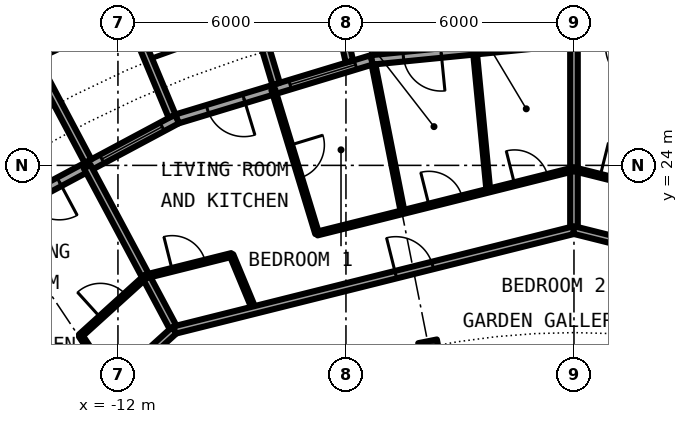
"""IFC4 building model, lengths in metres.
Left out: names, types, materials, properties, quantities, classifications, styles, units other than length and angle.
Written with IfcOpenShell. Run it as: python <this file> out.ifc"""

import sys

from ifc_helpers import new_model, si_unit, direction, frame, frame_2d, origin, origin_2d, place, context, subcontext, project, spatial, rectangle, circle, i_section, extrude, element, fill, save


model = new_model("IFC4")
c1 = context("Model", 3, precision=1e-05, world=origin(), true_north=direction((0.0, 1.0)))
c2 = subcontext(c1, "Body", "Model", "MODEL_VIEW")
j1 = project(units=[si_unit("LENGTHUNIT", "METRE"), si_unit("PLANEANGLEUNIT", "RADIAN")], contexts=[c1])
p1 = place(None, origin())
s1 = spatial("IfcSite", under=j1, at=p1, CompositionType="ELEMENT")
p2 = place(p1, origin())
s2 = spatial("IfcBuilding", under=s1, at=p2, CompositionType="ELEMENT")
p3 = place(p2, frame((0.0, 0.0, 151.3)))
s3 = spatial("IfcBuildingStorey", under=s2, at=p3, CompositionType="ELEMENT", Elevation=151.3)
p4 = place(p3, frame((-3.824, 19.223, 0.0), z_axis=(0.0, 0.0, 1.0), x_axis=(-0.195090322016, 0.980785280403, 0.0)))
e1 = element("IfcColumn", 1, at=p4, inside=s3, PredefinedType="COLUMN", context=c2, shape_type="SweptSolid", body=[
    extrude(i_section(OverallWidth=0.3, OverallDepth=0.5, WebThickness=0.014, FlangeThickness=0.028, FilletRadius=0.027, at=origin_2d()), origin(), (0.0, 0.0, 1.0), 3.05),
])
p5 = place(p3, frame((5.326, 26.775, 0.0), z_axis=(0.0, 0.0, 1.0), x_axis=(-0.995173996315, 0.098126026407, 0.0)))
e2 = element("IfcWall", 2, at=p5, inside=s3, PredefinedType="SOLIDWALL", context=c2, shape_type="SweptSolid", body=[
    extrude(rectangle(XDim=5.352, YDim=0.25, at=frame_2d((2.676, 0.0))), origin(), (0.0, 0.0, 1.0), 2.7),
])
p6 = place(p5, frame((0.441, 0.0, 0.3)))
e3 = element("IfcOpeningElement", 3, at=p6, cuts=e2, PredefinedType="OPENING", context=c2, shape_type="SweptSolid", body=[
    extrude(rectangle(XDim=1.8, YDim=2.1, at=frame_2d((0.9, 1.05))), frame((0.0, 0.135, 0.0), z_axis=(0.0, -1.0, 0.0), x_axis=(1.0, 0.0, 0.0)), (0.0, 0.0, 1.0), 0.27),
])
p7 = place(p5, frame((3.51, 0.0, 0.0)))
e4 = element("IfcOpeningElement", 4, at=p7, cuts=e2, PredefinedType="OPENING", context=c2, shape_type="SweptSolid", body=[
    extrude(rectangle(XDim=1.0, YDim=2.2, at=frame_2d((0.5, 1.1))), frame((0.0, 0.135, 0.0), z_axis=(0.0, -1.0, 0.0), x_axis=(1.0, 0.0, 0.0)), (0.0, 0.0, 1.0), 0.27),
])
p8 = place(p3, frame((0.0, 27.3, 0.0), z_axis=(0.0, 0.0, 1.0), x_axis=(-0.995173996315, -0.098126026407, 0.0)))
e5 = element("IfcWall", 5, at=p8, inside=s3, PredefinedType="SOLIDWALL", context=c2, shape_type="SweptSolid", body=[
    extrude(rectangle(XDim=5.352, YDim=0.25, at=frame_2d((2.676, 0.0))), origin(), (0.0, 0.0, 1.0), 2.7),
])
p9 = place(p8, frame((0.441, 0.0, 0.3)))
e6 = element("IfcOpeningElement", 6, at=p9, cuts=e5, PredefinedType="OPENING", context=c2, shape_type="SweptSolid", body=[
    extrude(rectangle(XDim=1.8, YDim=2.1, at=frame_2d((0.9, 1.05))), frame((0.0, 0.135, 0.0), z_axis=(0.0, -1.0, 0.0), x_axis=(1.0, 0.0, 0.0)), (0.0, 0.0, 1.0), 0.27),
])
p10 = place(p8, frame((3.51, 0.0, 0.0)))
e7 = element("IfcOpeningElement", 7, at=p10, cuts=e5, PredefinedType="OPENING", context=c2, shape_type="SweptSolid", body=[
    extrude(rectangle(XDim=1.0, YDim=2.2, at=frame_2d((0.5, 1.1))), frame((0.0, 0.135, 0.0), z_axis=(0.0, -1.0, 0.0), x_axis=(1.0, 0.0, 0.0)), (0.0, 0.0, 1.0), 0.27),
])
p11 = place(p3, frame((-5.326, 26.775, 0.0), z_axis=(0.0, 0.0, 1.0), x_axis=(-0.956965678721, -0.290201119486, 0.0)))
e8 = element("IfcWall", 8, at=p11, inside=s3, PredefinedType="SOLIDWALL", context=c2, shape_type="SweptSolid", body=[
    extrude(rectangle(XDim=5.351, YDim=0.25, at=frame_2d((2.676, 0.0))), origin(), (0.0, 0.0, 1.0), 2.7),
])
p12 = place(p11, frame((0.441, 0.0, 0.3)))
e9 = element("IfcOpeningElement", 9, at=p12, cuts=e8, PredefinedType="OPENING", context=c2, shape_type="SweptSolid", body=[
    extrude(rectangle(XDim=1.8, YDim=2.1, at=frame_2d((0.9, 1.05))), frame((0.0, 0.135, 0.0), z_axis=(0.0, -1.0, 0.0), x_axis=(1.0, 0.0, 0.0)), (0.0, 0.0, 1.0), 0.27),
])
p13 = place(p11, frame((3.51, 0.0, 0.0)))
e10 = element("IfcOpeningElement", 10, at=p13, cuts=e8, PredefinedType="OPENING", context=c2, shape_type="SweptSolid", body=[
    extrude(rectangle(XDim=1.0, YDim=2.2, at=frame_2d((0.5, 1.1))), frame((0.0, 0.135, 0.0), z_axis=(0.0, -1.0, 0.0), x_axis=(1.0, 0.0, 0.0)), (0.0, 0.0, 1.0), 0.27),
])
p14 = place(p3, frame((-5.909, 26.729, -0.03), z_axis=(0.0, 0.0, 1.0), x_axis=(-0.216409053917, 0.976302781612, 0.0)))
e11 = element("IfcWall", 11, at=p14, inside=s3, PredefinedType="SOLIDWALL", context=c2, shape_type="SweptSolid", body=[
    extrude(rectangle(XDim=2.925, YDim=0.2, at=frame_2d((1.463, 0.0))), origin(), (0.0, 0.0, 1.0), 2.73),
])
p15 = place(p3, frame((-7.837, 26.144, -0.03), z_axis=(0.0, 0.0, 1.0), x_axis=(-0.287064767992, 0.957911174889, 0.0)))
e12 = element("IfcWall", 12, at=p15, inside=s3, PredefinedType="SOLIDWALL", context=c2, shape_type="SweptSolid", body=[
    extrude(rectangle(XDim=3.006, YDim=0.2, at=frame_2d((1.503, 0.0))), origin(), (0.0, 0.0, 1.0), 2.73),
])
p16 = place(p3, frame((-10.447, 25.222, 0.0), z_axis=(0.0, 0.0, 1.0), x_axis=(-0.881915646801, -0.471407246368, 0.0)))
e13 = element("IfcWall", 13, at=p16, inside=s3, PredefinedType="SOLIDWALL", context=c2, shape_type="SweptSolid", body=[
    extrude(rectangle(XDim=5.352, YDim=0.25, at=frame_2d((2.676, 0.0))), origin(), (0.0, 0.0, 1.0), 2.7),
])
p17 = place(p16, frame((0.441, 0.0, 0.3)))
e14 = element("IfcOpeningElement", 14, at=p17, cuts=e13, PredefinedType="OPENING", context=c2, shape_type="SweptSolid", body=[
    extrude(rectangle(XDim=1.8, YDim=2.1, at=frame_2d((0.9, 1.05))), frame((0.0, 0.135, 0.0), z_axis=(0.0, -1.0, 0.0), x_axis=(1.0, 0.0, 0.0)), (0.0, 0.0, 1.0), 0.27),
])
p18 = place(p16, frame((3.51, 0.0, 0.0)))
e15 = element("IfcOpeningElement", 15, at=p18, cuts=e13, PredefinedType="OPENING", context=c2, shape_type="SweptSolid", body=[
    extrude(rectangle(XDim=1.0, YDim=2.2, at=frame_2d((0.5, 1.1))), frame((0.0, 0.135, 0.0), z_axis=(0.0, -1.0, 0.0), x_axis=(1.0, 0.0, 0.0)), (0.0, 0.0, 1.0), 0.27),
])
p19 = place(p3, frame((-11.629, 28.088, -0.03), z_axis=(0.0, 0.0, 1.0), x_axis=(-0.904000060331, -0.427532327342, 0.0)))
e16 = element("IfcWall", 16, at=p19, inside=s3, PredefinedType="SOLIDWALL", context=c2, shape_type="SweptSolid", body=[
    extrude(rectangle(XDim=2.993, YDim=0.2, at=frame_2d((1.497, 0.0))), origin(), (0.0, 0.0, 1.0), 2.73),
])
p20 = place(p19, frame((0.457, 0.0, 0.33)))
e17 = element("IfcOpeningElement", 17, at=p20, cuts=e16, PredefinedType="OPENING", context=c2, shape_type="SweptSolid", body=[
    extrude(circle(Radius=1.04, at=frame_2d((1.04, 1.04))), frame((0.0, 0.11, 0.0), z_axis=(0.0, -1.0, 0.0), x_axis=(1.0, 0.0, 0.0)), (0.0, 0.0, 1.0), 0.22),
])
p21 = place(p3, frame((-10.575, 25.295, -0.03), z_axis=(0.0, 0.0, 1.0), x_axis=(-0.385697364644, 0.922625353492, 0.0)))
e18 = element("IfcWall", 18, at=p21, inside=s3, PredefinedType="SOLIDWALL", context=c2, shape_type="SweptSolid", body=[
    extrude(rectangle(XDim=2.883, YDim=0.2, at=frame_2d((1.442, 0.0))), origin(), (0.0, 0.0, 1.0), 2.73),
])
p22 = place(p3, frame((-12.787, 24.113, -0.03), z_axis=(0.0, 0.0, 1.0), x_axis=(-0.468365282436, 0.883534924159, 0.0)))
e19 = element("IfcWall", 19, at=p22, inside=s3, PredefinedType="SOLIDWALL", context=c2, shape_type="SweptSolid", body=[
    extrude(rectangle(XDim=3.006, YDim=0.2, at=frame_2d((1.503, 0.0))), origin(), (0.0, 0.0, 1.0), 2.73),
])
p23 = place(p3, frame((-12.984, 19.521, 0.0), z_axis=(0.0, 0.0, 1.0), x_axis=(0.55373148684, -0.832695286694, 0.0)))
e20 = element("IfcWall", 20, at=p23, inside=s3, PredefinedType="PARTITIONING", context=c2, shape_type="SweptSolid", body=[
    extrude(rectangle(XDim=1.571, YDim=0.1, at=frame_2d((0.786, 0.0))), origin(), (0.0, 0.0, 1.0), 2.7),
])
p24 = place(p3, frame((-9.013, 21.642, 0.0), z_axis=(0.0, 0.0, 1.0), x_axis=(0.384228756538, -0.923237923099, 0.0)))
e21 = element("IfcWall", 21, at=p24, inside=s3, PredefinedType="PARTITIONING", context=c2, shape_type="SweptSolid", body=[
    extrude(rectangle(XDim=1.569, YDim=0.1, at=frame_2d((0.785, 0.0))), origin(), (0.0, 0.0, 1.0), 2.7),
])
p25 = place(p3, frame((-12.809, 23.966, 0.0), z_axis=(0.0, 0.0, 1.0), x_axis=(0.471271812246, -0.881988026553, 0.0)))
e22 = element("IfcWall", 22, at=p25, inside=s3, PredefinedType="PARTITIONING", context=c2, shape_type="SweptSolid", body=[
    extrude(rectangle(XDim=4.874, YDim=0.2, at=frame_2d((2.437, 0.0))), origin(), (0.0, 0.0, 1.0), 2.7),
])
p26 = place(p3, frame((-7.914, 25.997, 0.0), z_axis=(0.0, 0.0, 1.0), x_axis=(0.291291575636, -0.956634317785, 0.0)))
e23 = element("IfcWall", 23, at=p26, inside=s3, PredefinedType="PARTITIONING", context=c2, shape_type="SweptSolid", body=[
    extrude(rectangle(XDim=3.962, YDim=0.1, at=frame_2d((1.981, 0.0))), origin(), (0.0, 0.0, 1.0), 2.7),
])
p27 = place(p26, frame((1.531, 0.0, 0.0)))
e24 = element("IfcOpeningElement", 24, at=p27, cuts=e23, PredefinedType="OPENING", context=c2, shape_type="SweptSolid", body=[
    extrude(rectangle(XDim=0.9, YDim=2.3, at=frame_2d((0.45, 1.15))), frame((0.0, 0.06, 0.0), z_axis=(0.0, -1.0, 0.0), x_axis=(1.0, 0.0, 0.0)), (0.0, 0.0, 1.0), 0.12),
])
p28 = place(p3, frame((-5.276, 26.658, 0.0), z_axis=(0.0, 0.0, 1.0), x_axis=(0.194030211642, -0.980995554001, 0.0)))
e25 = element("IfcWall", 25, at=p28, inside=s3, PredefinedType="PARTITIONING", context=c2, shape_type="SweptSolid", body=[
    extrude(rectangle(XDim=3.962, YDim=0.1, at=frame_2d((1.981, 0.0))), origin(), (0.0, 0.0, 1.0), 2.7),
])
p29 = place(p3, frame((-2.612, 27.049, 0.0), z_axis=(0.0, 0.0, 1.0), x_axis=(0.09626981452, -0.995355274669, 0.0)))
e26 = element("IfcWall", 26, at=p29, inside=s3, PredefinedType="PARTITIONING", context=c2, shape_type="SweptSolid", body=[
    extrude(rectangle(XDim=3.73, YDim=0.1, at=frame_2d((1.865, 0.0))), origin(), (0.0, 0.0, 1.0), 2.7),
])
p30 = place(p3, frame((0.0, 22.3, 0.0), z_axis=(0.0, 0.0, 1.0), x_axis=(0.0, 1.0, 0.0)))
e27 = element("IfcWall", 27, at=p30, inside=s3, PredefinedType="PARTITIONING", context=c2, shape_type="SweptSolid", body=[
    extrude(rectangle(XDim=4.875, YDim=0.2, at=frame_2d((2.438, 0.0))), origin(), (0.0, 0.0, 1.0), 2.7),
])
p31 = place(p3, frame((-18.544, 12.385, 0.0), z_axis=(0.0, 0.0, 1.0), x_axis=(0.740849323054, 0.67167125927, 0.0)))
e28 = element("IfcWall", 28, at=p31, inside=s3, PredefinedType="PARTITIONING", context=c2, shape_type="SweptSolid", body=[
    extrude(rectangle(XDim=10.842, YDim=0.2, at=frame_2d((5.421, 0.0))), origin(), (0.0, 0.0, 1.0), 2.7),
])
p32 = place(p31, frame((3.839, 0.0, 0.0)))
e29 = element("IfcOpeningElement", 29, at=p32, cuts=e28, PredefinedType="OPENING", context=c2, shape_type="SweptSolid", body=[
    extrude(rectangle(XDim=1.0, YDim=2.3, at=frame_2d((0.5, 1.15))), frame((0.0, 0.11, 0.0), z_axis=(0.0, -1.0, 0.0), x_axis=(1.0, 0.0, 0.0)), (0.0, 0.0, 1.0), 0.22),
])
p33 = place(p3, frame((-10.512, 19.667, 0.0), z_axis=(0.0, 0.0, 1.0), x_axis=(0.970086843848, 0.242758141765, 0.0)))
e30 = element("IfcWall", 30, at=p33, inside=s3, PredefinedType="PARTITIONING", context=c2, shape_type="SweptSolid", body=[
    extrude(rectangle(XDim=10.842, YDim=0.2, at=frame_2d((5.421, 0.0))), origin(), (0.0, 0.0, 1.0), 2.7),
])
p34 = place(p33, frame((6.002, 0.0, 0.0)))
e31 = element("IfcOpeningElement", 31, at=p34, cuts=e30, PredefinedType="OPENING", context=c2, shape_type="SweptSolid", body=[
    extrude(rectangle(XDim=1.0, YDim=2.3, at=frame_2d((0.5, 1.15))), frame((0.0, 0.11, 0.0), z_axis=(0.0, -1.0, 0.0), x_axis=(1.0, 0.0, 0.0)), (0.0, 0.0, 1.0), 0.22),
])
p35 = place(p3, frame((-0.006, 22.299, 0.0), z_axis=(0.0, 0.0, 1.0), x_axis=(0.970086843848, -0.242758141765, 0.0)))
e32 = element("IfcWall", 32, at=p35, inside=s3, PredefinedType="PARTITIONING", context=c2, shape_type="SweptSolid", body=[
    extrude(rectangle(XDim=10.842, YDim=0.2, at=frame_2d((5.421, 0.0))), origin(), (0.0, 0.0, 1.0), 2.7),
])
p36 = place(p35, frame((3.841, 0.0, 0.0)))
e33 = element("IfcOpeningElement", 33, at=p36, cuts=e32, PredefinedType="OPENING", context=c2, shape_type="SweptSolid", body=[
    extrude(rectangle(XDim=1.0, YDim=2.3, at=frame_2d((0.5, 1.15))), frame((0.0, 0.11, 0.0), z_axis=(0.0, -1.0, 0.0), x_axis=(1.0, 0.0, 0.0)), (0.0, 0.0, 1.0), 0.22),
])
p37 = place(p3, frame((-12.993, 19.513, 0.0), z_axis=(0.0, 0.0, 1.0), x_axis=(0.74087097024, 0.671647381783, 0.0)))
e34 = element("IfcWall", 34, at=p37, inside=s3, PredefinedType="PARTITIONING", context=c2, shape_type="SweptSolid", body=[
    extrude(rectangle(XDim=2.324, YDim=0.1, at=frame_2d((1.162, 0.0))), origin(), (0.0, 0.0, 1.0), 2.7),
])
p38 = place(p37, frame((0.719, 0.0, 0.0)))
e35 = element("IfcOpeningElement", 35, at=p38, cuts=e34, PredefinedType="OPENING", context=c2, shape_type="SweptSolid", body=[
    extrude(rectangle(XDim=0.9, YDim=2.3, at=frame_2d((0.45, 1.15))), frame((0.0, 0.06, 0.0), z_axis=(0.0, -1.0, 0.0), x_axis=(1.0, 0.0, 0.0)), (0.0, 0.0, 1.0), 0.12),
])
p39 = place(p3, frame((-11.266, 21.078, 0.0), z_axis=(0.0, 0.0, 1.0), x_axis=(0.970074595874, 0.242807080706, 0.0)))
e36 = element("IfcWall", 36, at=p39, inside=s3, PredefinedType="PARTITIONING", context=c2, shape_type="SweptSolid", body=[
    extrude(rectangle(XDim=2.328, YDim=0.1, at=frame_2d((1.164, 0.0))), origin(), (0.0, 0.0, 1.0), 2.7),
])
p40 = place(p39, frame((0.714, 0.0, 0.0)))
e37 = element("IfcOpeningElement", 37, at=p40, cuts=e36, PredefinedType="OPENING", context=c2, shape_type="SweptSolid", body=[
    extrude(rectangle(XDim=0.9, YDim=2.3, at=frame_2d((0.45, 1.15))), frame((0.0, 0.06, 0.0), z_axis=(0.0, -1.0, 0.0), x_axis=(1.0, 0.0, 0.0)), (0.0, 0.0, 1.0), 0.12),
])
p41 = place(p3, frame((-6.76, 22.206, 0.0), z_axis=(0.0, 0.0, 1.0), x_axis=(0.970070358667, 0.242824008772, 0.0)))
e38 = element("IfcWall", 38, at=p41, inside=s3, PredefinedType="PARTITIONING", context=c2, shape_type="SweptSolid", body=[
    extrude(rectangle(XDim=6.972, YDim=0.1, at=frame_2d((3.486, 0.0))), origin(), (0.0, 0.0, 1.0), 2.7),
])
p42 = place(p41, frame((3.037, 0.0, 0.0)))
e39 = element("IfcOpeningElement", 39, at=p42, cuts=e38, PredefinedType="OPENING", context=c2, shape_type="SweptSolid", body=[
    extrude(rectangle(XDim=0.9, YDim=2.3, at=frame_2d((0.45, 1.15))), frame((0.0, 0.06, 0.0), z_axis=(0.0, -1.0, 0.0), x_axis=(1.0, 0.0, 0.0)), (0.0, 0.0, 1.0), 0.12),
])
p43 = place(p41, frame((5.357, 0.0, 0.0)))
e40 = element("IfcOpeningElement", 40, at=p43, cuts=e38, PredefinedType="OPENING", context=c2, shape_type="SweptSolid", body=[
    extrude(rectangle(XDim=0.9, YDim=2.3, at=frame_2d((0.45, 1.15))), frame((0.0, 0.06, 0.0), z_axis=(0.0, -1.0, 0.0), x_axis=(1.0, 0.0, 0.0)), (0.0, 0.0, 1.0), 0.12),
])
p44 = place(p3, frame((-0.003, 23.899, 0.0), z_axis=(0.0, 0.0, 1.0), x_axis=(0.970070358667, -0.242824008772, 0.0)))
e41 = element("IfcWall", 41, at=p44, inside=s3, PredefinedType="PARTITIONING", context=c2, shape_type="SweptSolid", body=[
    extrude(rectangle(XDim=6.972, YDim=0.1, at=frame_2d((3.486, 0.0))), origin(), (0.0, 0.0, 1.0), 2.7),
])
p45 = place(p44, frame((3.035, 0.0, 0.0)))
e42 = element("IfcOpeningElement", 42, at=p45, cuts=e41, PredefinedType="OPENING", context=c2, shape_type="SweptSolid", body=[
    extrude(rectangle(XDim=0.9, YDim=2.3, at=frame_2d((0.45, 1.15))), frame((0.0, 0.06, 0.0), z_axis=(0.0, -1.0, 0.0), x_axis=(1.0, 0.0, 0.0)), (0.0, 0.0, 1.0), 0.12),
])
p46 = place(p44, frame((0.715, 0.0, 0.0)))
e43 = element("IfcOpeningElement", 43, at=p46, cuts=e41, PredefinedType="OPENING", context=c2, shape_type="SweptSolid", body=[
    extrude(rectangle(XDim=0.9, YDim=2.3, at=frame_2d((0.45, 1.15))), frame((0.0, 0.06, 0.0), z_axis=(0.0, -1.0, 0.0), x_axis=(1.0, 0.0, 0.0)), (0.0, 0.0, 1.0), 0.12),
])
p47 = place(p10, origin())
e44 = element("IfcDoor", 44, at=p47, inside=s3, OperationType="SINGLE_SWING_LEFT", PredefinedType="DOOR", context=c2, shape_type="SweptSolid", body=[
    extrude(rectangle(XDim=1.0, YDim=2.2, at=frame_2d((0.5, 1.1))), frame((0.0, 0.025, 0.0), z_axis=(0.0, -1.0, 0.0), x_axis=(1.0, 0.0, 0.0)), (0.0, 0.0, 1.0), 0.05),
])
fill(e7, e44)
p48 = place(p12, origin())
e45 = element("IfcWindow", 45, at=p48, inside=s3, PartitioningType="SINGLE_PANEL", PredefinedType="WINDOW", context=c2, shape_type="SweptSolid", body=[
    extrude(rectangle(XDim=1.8, YDim=2.1, at=frame_2d((0.9, 1.05))), frame((0.0, 0.03, 0.0), z_axis=(0.0, -1.0, 0.0), x_axis=(1.0, 0.0, 0.0)), (0.0, 0.0, 1.0), 0.06),
])
fill(e9, e45)
p49 = place(p13, origin())
e46 = element("IfcDoor", 46, at=p49, inside=s3, OperationType="SINGLE_SWING_LEFT", PredefinedType="DOOR", context=c2, shape_type="SweptSolid", body=[
    extrude(rectangle(XDim=1.0, YDim=2.2, at=frame_2d((0.5, 1.1))), frame((0.0, 0.025, 0.0), z_axis=(0.0, -1.0, 0.0), x_axis=(1.0, 0.0, 0.0)), (0.0, 0.0, 1.0), 0.05),
])
fill(e10, e46)
p50 = place(p17, origin())
e47 = element("IfcWindow", 47, at=p50, inside=s3, PartitioningType="SINGLE_PANEL", PredefinedType="WINDOW", context=c2, shape_type="SweptSolid", body=[
    extrude(rectangle(XDim=1.8, YDim=2.1, at=frame_2d((0.9, 1.05))), frame((0.0, 0.03, 0.0), z_axis=(0.0, -1.0, 0.0), x_axis=(1.0, 0.0, 0.0)), (0.0, 0.0, 1.0), 0.06),
])
fill(e14, e47)
p51 = place(p20, origin())
e48 = element("IfcWindow", 48, at=p51, inside=s3, PartitioningType="SINGLE_PANEL", PredefinedType="WINDOW", context=c2, shape_type="SweptSolid", body=[
    extrude(circle(Radius=1.04, at=frame_2d((1.04, 1.04))), frame((0.0, 0.03, 0.0), z_axis=(0.0, -1.0, 0.0), x_axis=(1.0, 0.0, 0.0)), (0.0, 0.0, 1.0), 0.06),
])
fill(e17, e48)
p52 = place(p18, origin())
e49 = element("IfcDoor", 49, at=p52, inside=s3, OperationType="SINGLE_SWING_LEFT", PredefinedType="DOOR", context=c2, shape_type="SweptSolid", body=[
    extrude(rectangle(XDim=1.0, YDim=2.2, at=frame_2d((0.5, 1.1))), frame((0.0, 0.025, 0.0), z_axis=(0.0, -1.0, 0.0), x_axis=(1.0, 0.0, 0.0)), (0.0, 0.0, 1.0), 0.05),
])
fill(e15, e49)
p53 = place(p46, origin())
e50 = element("IfcDoor", 50, at=p53, inside=s3, OperationType="SINGLE_SWING_LEFT", PredefinedType="DOOR", context=c2, shape_type="SweptSolid", body=[
    extrude(rectangle(XDim=0.9, YDim=2.3, at=frame_2d((0.45, 1.15))), frame((0.0, 0.025, 0.0), z_axis=(0.0, -1.0, 0.0), x_axis=(1.0, 0.0, 0.0)), (0.0, 0.0, 1.0), 0.05),
])
fill(e43, e50)
p54 = place(p34, origin())
e51 = element("IfcDoor", 51, at=p54, inside=s3, OperationType="SINGLE_SWING_RIGHT", PredefinedType="DOOR", context=c2, shape_type="SweptSolid", body=[
    extrude(rectangle(XDim=1.0, YDim=2.3, at=frame_2d((0.5, 1.15))), frame((0.0, 0.025, 0.0), z_axis=(0.0, -1.0, 0.0), x_axis=(1.0, 0.0, 0.0)), (0.0, 0.0, 1.0), 0.05),
])
fill(e31, e51)
p55 = place(p40, origin())
e52 = element("IfcDoor", 52, at=p55, inside=s3, OperationType="SINGLE_SWING_RIGHT", PredefinedType="DOOR", context=c2, shape_type="SweptSolid", body=[
    extrude(rectangle(XDim=0.9, YDim=2.3, at=frame_2d((0.45, 1.15))), frame((0.0, 0.025, 0.0), z_axis=(0.0, -1.0, 0.0), x_axis=(1.0, 0.0, 0.0)), (0.0, 0.0, 1.0), 0.05),
])
fill(e37, e52)
p56 = place(p27, origin())
e53 = element("IfcDoor", 53, at=p56, inside=s3, OperationType="SINGLE_SWING_RIGHT", PredefinedType="DOOR", context=c2, shape_type="SweptSolid", body=[
    extrude(rectangle(XDim=0.9, YDim=2.3, at=frame_2d((0.45, 1.15))), frame((0.0, 0.025, 0.0), z_axis=(0.0, -1.0, 0.0), x_axis=(1.0, 0.0, 0.0)), (0.0, 0.0, 1.0), 0.05),
])
fill(e24, e53)
p57 = place(p42, origin())
e54 = element("IfcDoor", 54, at=p57, inside=s3, OperationType="SINGLE_SWING_RIGHT", PredefinedType="DOOR", context=c2, shape_type="SweptSolid", body=[
    extrude(rectangle(XDim=0.9, YDim=2.3, at=frame_2d((0.45, 1.15))), frame((0.0, 0.025, 0.0), z_axis=(0.0, -1.0, 0.0), x_axis=(1.0, 0.0, 0.0)), (0.0, 0.0, 1.0), 0.05),
])
fill(e39, e54)
p58 = place(p43, origin())
e55 = element("IfcDoor", 55, at=p58, inside=s3, OperationType="SINGLE_SWING_RIGHT", PredefinedType="DOOR", context=c2, shape_type="SweptSolid", body=[
    extrude(rectangle(XDim=0.9, YDim=2.3, at=frame_2d((0.45, 1.15))), frame((0.0, 0.025, 0.0), z_axis=(0.0, -1.0, 0.0), x_axis=(1.0, 0.0, 0.0)), (0.0, 0.0, 1.0), 0.05),
])
fill(e40, e55)
p59 = place(p38, origin())
e56 = element("IfcDoor", 56, at=p59, inside=s3, OperationType="SINGLE_SWING_RIGHT", PredefinedType="DOOR", context=c2, shape_type="SweptSolid", body=[
    extrude(rectangle(XDim=0.9, YDim=2.3, at=frame_2d((0.45, 1.15))), frame((0.0, 0.025, 0.0), z_axis=(0.0, -1.0, 0.0), x_axis=(1.0, 0.0, 0.0)), (0.0, 0.0, 1.0), 0.05),
])
fill(e35, e56)
save(model, sys.argv[1])
